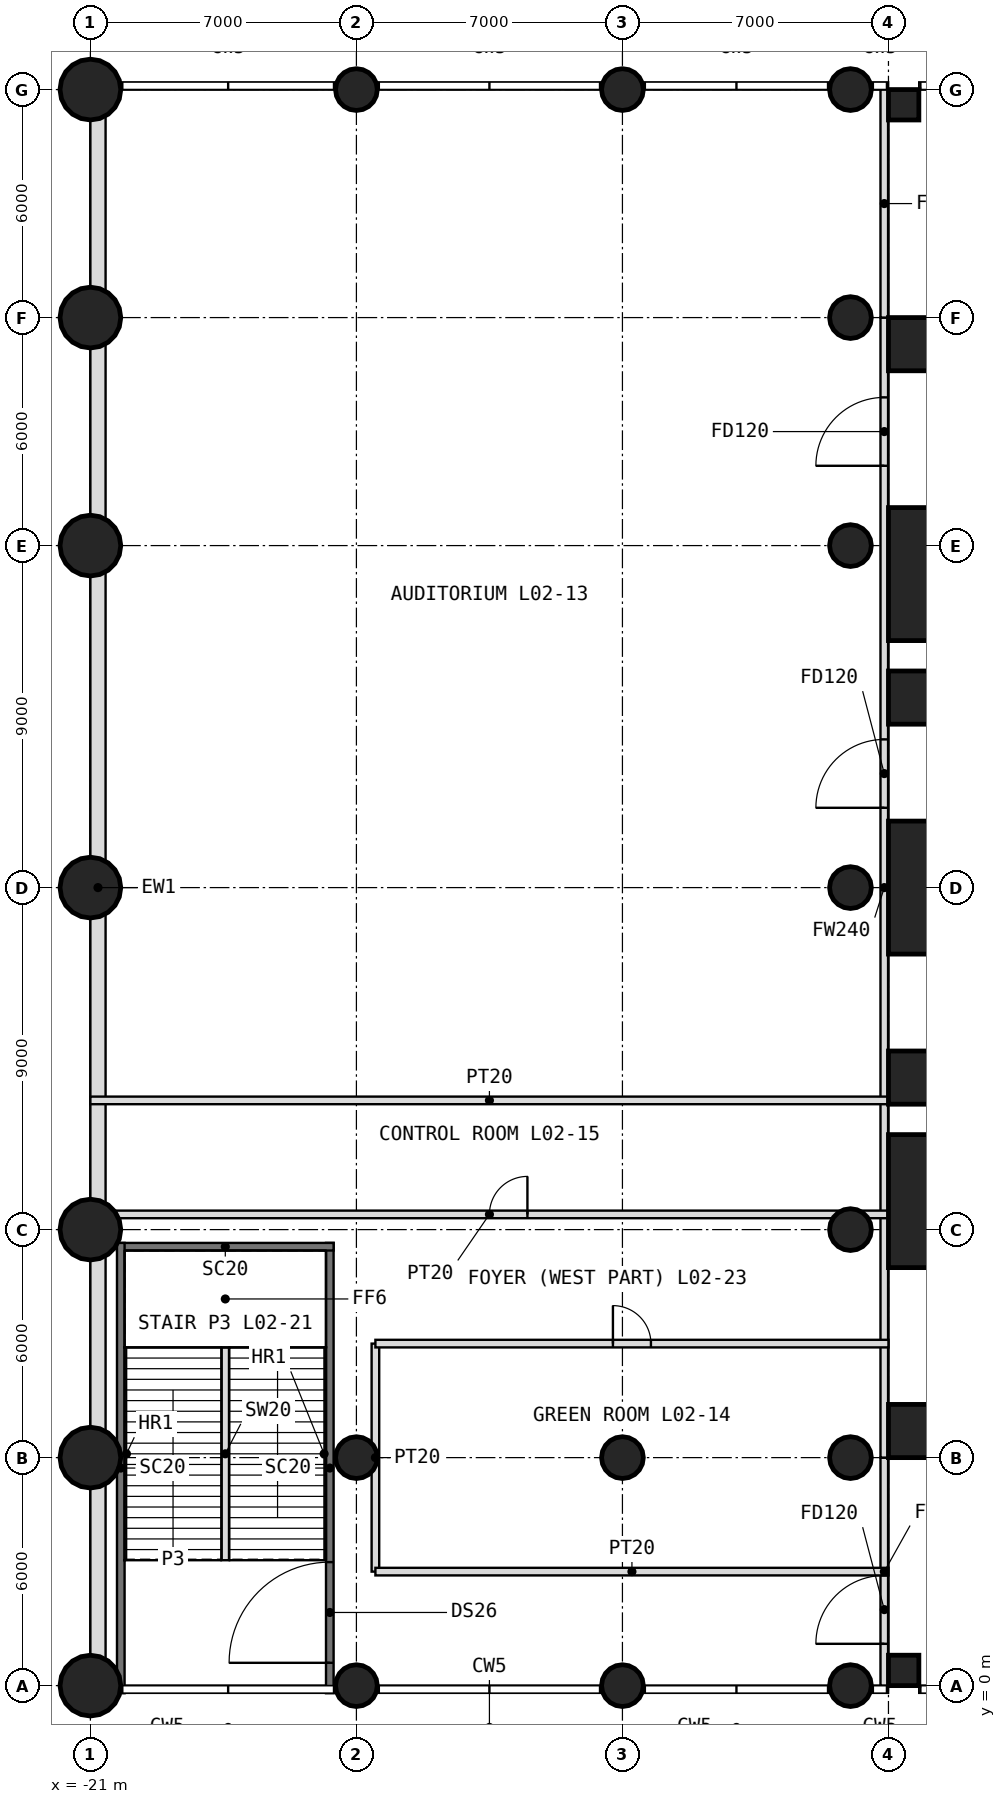
"""IFC4 building model, lengths in metres.
Left out: names, types, materials, properties, quantities, classifications, styles, units other than length and angle.
Written with IfcOpenShell. Run it as: python <this file> out.ifc"""

import sys

from ifc_helpers import new_model, si_unit, direction, frame, frame_2d, origin, origin_2d, place, context, subcontext, project, spatial, rectangle, circle, extrude, element, fill, save


model = new_model("IFC4")
c1 = context("Model", 3, precision=1e-05, world=origin(), true_north=direction((0.0, 1.0)))
c2 = subcontext(c1, "Body", "Model", "MODEL_VIEW")
j1 = project(units=[si_unit("LENGTHUNIT", "METRE"), si_unit("PLANEANGLEUNIT", "RADIAN")], contexts=[c1])
p1 = place(None, origin())
s1 = spatial("IfcSite", under=j1, at=p1, CompositionType="ELEMENT")
p2 = place(p1, origin())
s2 = spatial("IfcBuilding", under=s1, at=p2, CompositionType="ELEMENT")
p3 = place(p2, frame((0.0, 0.0, 11.0)))
s3 = spatial("IfcBuildingStorey", under=s2, at=p3, CompositionType="ELEMENT", Elevation=11.0)
p4 = place(p3, frame((-21.0, 0.0, 0.0), z_axis=(0.0, 0.0, 1.0), x_axis=(1.0, 0.0, 0.0)))
e1 = element("IfcColumn", 1, at=p4, inside=s3, PredefinedType="COLUMN", context=c2, shape_type="SweptSolid", body=[
    extrude(circle(Radius=0.8, at=origin_2d()), origin(), (0.0, 0.0, 1.0), 7.0),
])
for number, where, z_axis, x_axis in (
    (2, (-14.0, 0.0, 0.0), (0.0, 0.0, 1.0), (1.0, 0.0, 0.0)),
    (3, (-7.0, 0.0, 0.0), (0.0, 0.0, 1.0), (1.0, 0.0, 0.0)),
    (4, (-1.0, 0.0, 0.0), (0.0, 0.0, 1.0), (1.0, 0.0, 0.0)),
):
    element("IfcColumn", number, at=place(p3, frame(where, z_axis=z_axis, x_axis=x_axis)), inside=s3, PredefinedType="COLUMN", context=c2, shape_type="SweptSolid", body=[
        extrude(circle(Radius=0.55, at=origin_2d()), origin(), (0.0, 0.0, 1.0), 7.0),
    ])
p5 = place(p3, frame((0.4, 0.4, 0.0), z_axis=(0.0, 0.0, 1.0), x_axis=(1.0, 0.0, 0.0)))
e5 = element("IfcColumn", 5, at=p5, inside=s3, PredefinedType="COLUMN", context=c2, shape_type="SweptSolid", body=[
    extrude(rectangle(XDim=0.8, YDim=0.8, at=origin_2d()), origin(), (0.0, 0.0, 1.0), 7.0),
])
p6 = place(p3, frame((-21.0, 6.0, 0.0), z_axis=(0.0, 0.0, 1.0), x_axis=(1.0, 0.0, 0.0)))
e6 = element("IfcColumn", 6, at=p6, inside=s3, PredefinedType="COLUMN", context=c2, shape_type="SweptSolid", body=[
    extrude(circle(Radius=0.8, at=origin_2d()), origin(), (0.0, 0.0, 1.0), 7.0),
])
for number, where, z_axis, x_axis in (
    (7, (-14.0, 6.0, 0.0), (0.0, 0.0, 1.0), (1.0, 0.0, 0.0)),
    (8, (-7.0, 6.0, 0.0), (0.0, 0.0, 1.0), (1.0, 0.0, 0.0)),
    (9, (-1.0, 6.0, 0.0), (0.0, 0.0, 1.0), (1.0, 0.0, 0.0)),
):
    element("IfcColumn", number, at=place(p3, frame(where, z_axis=z_axis, x_axis=x_axis)), inside=s3, PredefinedType="COLUMN", context=c2, shape_type="SweptSolid", body=[
        extrude(circle(Radius=0.55, at=origin_2d()), origin(), (0.0, 0.0, 1.0), 7.0),
    ])
p7 = place(p3, frame((0.7, 6.7, 0.0), z_axis=(0.0, 0.0, 1.0), x_axis=(1.0, 0.0, 0.0)))
e10 = element("IfcColumn", 10, at=p7, inside=s3, PredefinedType="COLUMN", context=c2, shape_type="SweptSolid", body=[
    extrude(rectangle(XDim=1.4, YDim=1.4, at=origin_2d()), origin(), (0.0, 0.0, 1.0), 7.0),
])
p8 = place(p3, frame((1.75, 12.75, 0.0), z_axis=(0.0, 0.0, 1.0), x_axis=(1.0, 0.0, 0.0)))
e11 = element("IfcColumn", 11, at=p8, inside=s3, PredefinedType="COLUMN", context=c2, shape_type="SweptSolid", body=[
    extrude(rectangle(XDim=3.5, YDim=3.5, at=origin_2d()), origin(), (0.0, 0.0, 1.0), 7.0),
])
p9 = place(p3, frame((-21.0, 12.0, 0.0), z_axis=(0.0, 0.0, 1.0), x_axis=(1.0, 0.0, 0.0)))
e12 = element("IfcColumn", 12, at=p9, inside=s3, PredefinedType="COLUMN", context=c2, shape_type="SweptSolid", body=[
    extrude(circle(Radius=0.8, at=origin_2d()), origin(), (0.0, 0.0, 1.0), 7.0),
])
p10 = place(p3, frame((-20.465, 12.0, 3.556), z_axis=(0.0, 0.0, 1.0), x_axis=(1.0, 0.0, 0.0)))
e13 = element("IfcOpeningElement", 13, at=p10, cuts=e12, PredefinedType="RECESS", context=c2, shape_type="SweptSolid", body=[
    extrude(rectangle(XDim=0.57, YDim=0.474, at=origin_2d()), origin(), (0.0, 0.0, 1.0), 0.719),
])
p11 = place(p3, frame((-1.0, 12.0, 0.0), z_axis=(0.0, 0.0, 1.0), x_axis=(1.0, 0.0, 0.0)))
e14 = element("IfcColumn", 14, at=p11, inside=s3, PredefinedType="COLUMN", context=c2, shape_type="SweptSolid", body=[
    extrude(circle(Radius=0.55, at=origin_2d()), origin(), (0.0, 0.0, 1.0), 7.0),
])
p12 = place(p3, frame((-1.41, 12.0, 3.556), z_axis=(0.0, 0.0, 1.0), x_axis=(1.0, 0.0, 0.0)))
e15 = element("IfcOpeningElement", 15, at=p12, cuts=e14, PredefinedType="RECESS", context=c2, shape_type="SweptSolid", body=[
    extrude(rectangle(XDim=0.32, YDim=0.474, at=origin_2d()), origin(), (0.0, 0.0, 1.0), 0.719),
])
p13 = place(p3, frame((0.7, 16.0, 0.0), z_axis=(0.0, 0.0, 1.0), x_axis=(1.0, 0.0, 0.0)))
e16 = element("IfcColumn", 16, at=p13, inside=s3, PredefinedType="COLUMN", context=c2, shape_type="SweptSolid", body=[
    extrude(rectangle(XDim=1.4, YDim=1.4, at=origin_2d()), origin(), (0.0, 0.0, 1.0), 7.0),
])
p14 = place(p3, frame((-21.0, 21.0, 0.0), z_axis=(0.0, 0.0, 1.0), x_axis=(1.0, 0.0, 0.0)))
e17 = element("IfcColumn", 17, at=p14, inside=s3, PredefinedType="COLUMN", context=c2, shape_type="SweptSolid", body=[
    extrude(circle(Radius=0.8, at=origin_2d()), origin(), (0.0, 0.0, 1.0), 7.0),
])
p15 = place(p3, frame((-20.465, 21.0, 3.556), z_axis=(0.0, 0.0, 1.0), x_axis=(1.0, 0.0, 0.0)))
e18 = element("IfcOpeningElement", 18, at=p15, cuts=e17, PredefinedType="RECESS", context=c2, shape_type="SweptSolid", body=[
    extrude(rectangle(XDim=0.57, YDim=0.474, at=origin_2d()), origin(), (0.0, 0.0, 1.0), 0.719),
])
p16 = place(p3, frame((-1.0, 21.0, 0.0), z_axis=(0.0, 0.0, 1.0), x_axis=(1.0, 0.0, 0.0)))
e19 = element("IfcColumn", 19, at=p16, inside=s3, PredefinedType="COLUMN", context=c2, shape_type="SweptSolid", body=[
    extrude(circle(Radius=0.55, at=origin_2d()), origin(), (0.0, 0.0, 1.0), 7.0),
])
p17 = place(p3, frame((-1.41, 21.0, 3.556), z_axis=(0.0, 0.0, 1.0), x_axis=(1.0, 0.0, 0.0)))
e20 = element("IfcOpeningElement", 20, at=p17, cuts=e19, PredefinedType="RECESS", context=c2, shape_type="SweptSolid", body=[
    extrude(rectangle(XDim=0.32, YDim=0.474, at=origin_2d()), origin(), (0.0, 0.0, 1.0), 0.719),
])
p18 = place(p3, frame((1.75, 21.0, 0.0), z_axis=(0.0, 0.0, 1.0), x_axis=(1.0, 0.0, 0.0)))
e21 = element("IfcColumn", 21, at=p18, inside=s3, PredefinedType="COLUMN", context=c2, shape_type="SweptSolid", body=[
    extrude(rectangle(XDim=3.5, YDim=3.5, at=origin_2d()), origin(), (0.0, 0.0, 1.0), 7.0),
])
p19 = place(p3, frame((0.7, 26.0, 0.0), z_axis=(0.0, 0.0, 1.0), x_axis=(1.0, 0.0, 0.0)))
e22 = element("IfcColumn", 22, at=p19, inside=s3, PredefinedType="COLUMN", context=c2, shape_type="SweptSolid", body=[
    extrude(rectangle(XDim=1.4, YDim=1.4, at=origin_2d()), origin(), (0.0, 0.0, 1.0), 7.0),
])
p20 = place(p3, frame((-21.0, 30.0, 0.0), z_axis=(0.0, 0.0, 1.0), x_axis=(1.0, 0.0, 0.0)))
e23 = element("IfcColumn", 23, at=p20, inside=s3, PredefinedType="COLUMN", context=c2, shape_type="SweptSolid", body=[
    extrude(circle(Radius=0.8, at=origin_2d()), origin(), (0.0, 0.0, 1.0), 7.0),
])
p21 = place(p3, frame((-20.465, 30.0, 3.556), z_axis=(0.0, 0.0, 1.0), x_axis=(1.0, 0.0, 0.0)))
e24 = element("IfcOpeningElement", 24, at=p21, cuts=e23, PredefinedType="RECESS", context=c2, shape_type="SweptSolid", body=[
    extrude(rectangle(XDim=0.57, YDim=0.474, at=origin_2d()), origin(), (0.0, 0.0, 1.0), 0.719),
])
p22 = place(p3, frame((-1.0, 30.0, 0.0), z_axis=(0.0, 0.0, 1.0), x_axis=(1.0, 0.0, 0.0)))
e25 = element("IfcColumn", 25, at=p22, inside=s3, PredefinedType="COLUMN", context=c2, shape_type="SweptSolid", body=[
    extrude(circle(Radius=0.55, at=origin_2d()), origin(), (0.0, 0.0, 1.0), 7.0),
])
p23 = place(p3, frame((-1.41, 30.0, 3.556), z_axis=(0.0, 0.0, 1.0), x_axis=(1.0, 0.0, 0.0)))
e26 = element("IfcOpeningElement", 26, at=p23, cuts=e25, PredefinedType="RECESS", context=c2, shape_type="SweptSolid", body=[
    extrude(rectangle(XDim=0.32, YDim=0.474, at=origin_2d()), origin(), (0.0, 0.0, 1.0), 0.719),
])
p24 = place(p3, frame((1.75, 29.25, 0.0), z_axis=(0.0, 0.0, 1.0), x_axis=(1.0, 0.0, 0.0)))
e27 = element("IfcColumn", 27, at=p24, inside=s3, PredefinedType="COLUMN", context=c2, shape_type="SweptSolid", body=[
    extrude(rectangle(XDim=3.5, YDim=3.5, at=origin_2d()), origin(), (0.0, 0.0, 1.0), 7.0),
])
p25 = place(p3, frame((-21.0, 36.0, 0.0), z_axis=(0.0, 0.0, 1.0), x_axis=(1.0, 0.0, 0.0)))
e28 = element("IfcColumn", 28, at=p25, inside=s3, PredefinedType="COLUMN", context=c2, shape_type="SweptSolid", body=[
    extrude(circle(Radius=0.8, at=origin_2d()), origin(), (0.0, 0.0, 1.0), 7.0),
])
p26 = place(p3, frame((-20.465, 36.0, 3.556), z_axis=(0.0, 0.0, 1.0), x_axis=(1.0, 0.0, 0.0)))
e29 = element("IfcOpeningElement", 29, at=p26, cuts=e28, PredefinedType="RECESS", context=c2, shape_type="SweptSolid", body=[
    extrude(rectangle(XDim=0.57, YDim=0.474, at=origin_2d()), origin(), (0.0, 0.0, 1.0), 0.719),
])
p27 = place(p3, frame((-1.0, 36.0, 0.0), z_axis=(0.0, 0.0, 1.0), x_axis=(1.0, 0.0, 0.0)))
e30 = element("IfcColumn", 30, at=p27, inside=s3, PredefinedType="COLUMN", context=c2, shape_type="SweptSolid", body=[
    extrude(circle(Radius=0.55, at=origin_2d()), origin(), (0.0, 0.0, 1.0), 7.0),
])
p28 = place(p3, frame((-1.41, 36.0, 3.556), z_axis=(0.0, 0.0, 1.0), x_axis=(1.0, 0.0, 0.0)))
e31 = element("IfcOpeningElement", 31, at=p28, cuts=e30, PredefinedType="RECESS", context=c2, shape_type="SweptSolid", body=[
    extrude(rectangle(XDim=0.32, YDim=0.474, at=origin_2d()), origin(), (0.0, 0.0, 1.0), 0.719),
])
p29 = place(p3, frame((0.7, 35.3, 0.0), z_axis=(0.0, 0.0, 1.0), x_axis=(1.0, 0.0, 0.0)))
e32 = element("IfcColumn", 32, at=p29, inside=s3, PredefinedType="COLUMN", context=c2, shape_type="SweptSolid", body=[
    extrude(rectangle(XDim=1.4, YDim=1.4, at=origin_2d()), origin(), (0.0, 0.0, 1.0), 7.0),
])
p30 = place(p3, frame((-21.0, 42.0, 0.0), z_axis=(0.0, 0.0, 1.0), x_axis=(1.0, 0.0, 0.0)))
e33 = element("IfcColumn", 33, at=p30, inside=s3, PredefinedType="COLUMN", context=c2, shape_type="SweptSolid", body=[
    extrude(circle(Radius=0.8, at=origin_2d()), origin(), (0.0, 0.0, 1.0), 7.0),
])
for number, where, z_axis, x_axis in (
    (34, (-14.0, 42.0, 0.0), (0.0, 0.0, 1.0), (1.0, 0.0, 0.0)),
    (35, (-7.0, 42.0, 0.0), (0.0, 0.0, 1.0), (1.0, 0.0, 0.0)),
    (36, (-1.0, 42.0, 0.0), (0.0, 0.0, 1.0), (1.0, 0.0, 0.0)),
):
    element("IfcColumn", number, at=place(p3, frame(where, z_axis=z_axis, x_axis=x_axis)), inside=s3, PredefinedType="COLUMN", context=c2, shape_type="SweptSolid", body=[
        extrude(circle(Radius=0.55, at=origin_2d()), origin(), (0.0, 0.0, 1.0), 7.0),
    ])
p31 = place(p3, frame((0.4, 41.6, 0.0), z_axis=(0.0, 0.0, 1.0), x_axis=(1.0, 0.0, 0.0)))
e37 = element("IfcColumn", 37, at=p31, inside=s3, PredefinedType="COLUMN", context=c2, shape_type="SweptSolid", body=[
    extrude(rectangle(XDim=0.8, YDim=0.8, at=origin_2d()), origin(), (0.0, 0.0, 1.0), 7.0),
])
p32 = place(p3, frame((-20.8, 42.0, 0.0), z_axis=(0.0, 0.0, 1.0), x_axis=(0.0, -1.0, 0.0)))
e38 = element("IfcWall", 38, at=p32, inside=s3, PredefinedType="SOLIDWALL", context=c2, shape_type="SweptSolid", body=[
    extrude(rectangle(XDim=42.0, YDim=0.4, at=frame_2d((21.0, 0.0))), origin(), (0.0, 0.0, 1.0), 5.6),
])
p33 = place(p3, frame((-14.7, -0.2, -0.3), z_axis=(0.0, 0.0, 1.0), x_axis=(0.0, 1.0, 0.0)))
e39 = element("IfcWall", 39, at=p33, inside=s3, PredefinedType="SOLIDWALL", context=c2, shape_type="SweptSolid", body=[
    extrude(rectangle(XDim=11.85, YDim=0.2, at=frame_2d((5.925, 0.0))), origin(), (0.0, 0.0, 1.0), 7.1),
])
p34 = place(p33, frame((0.8, 0.0, 0.3)))
e40 = element("IfcOpeningElement", 40, at=p34, cuts=e39, PredefinedType="OPENING", context=c2, shape_type="SweptSolid", body=[
    extrude(rectangle(XDim=2.65, YDim=2.4, at=frame_2d((1.325, 1.2))), frame((0.0, 0.11, 0.0), z_axis=(0.0, -1.0, 0.0), x_axis=(1.0, 0.0, 0.0)), (0.0, 0.0, 1.0), 0.22),
])
p35 = place(p3, frame((-14.6, 11.55, -0.3), z_axis=(0.0, 0.0, 1.0), x_axis=(-1.0, 0.0, 0.0)))
e41 = element("IfcWall", 41, at=p35, inside=s3, PredefinedType="SOLIDWALL", context=c2, shape_type="SweptSolid", body=[
    extrude(rectangle(XDim=5.7, YDim=0.2, at=frame_2d((2.85, 0.0))), origin(), (0.0, 0.0, 1.0), 7.1),
])
p36 = place(p3, frame((-20.2, 11.65, -0.3), z_axis=(0.0, 0.0, 1.0), x_axis=(0.0, -1.0, 0.0)))
e42 = element("IfcWall", 42, at=p36, inside=s3, PredefinedType="SOLIDWALL", context=c2, shape_type="SweptSolid", body=[
    extrude(rectangle(XDim=11.85, YDim=0.2, at=frame_2d((5.925, 0.0))), origin(), (0.0, 0.0, 1.0), 7.1),
])
p37 = place(p3, frame((-0.11, 0.0, 0.0), z_axis=(0.0, 0.0, 1.0), x_axis=(0.0, 1.0, 0.0)))
e43 = element("IfcWall", 43, at=p37, inside=s3, PredefinedType="PARTITIONING", context=c2, shape_type="SweptSolid", body=[
    extrude(rectangle(XDim=6.0, YDim=0.2, at=frame_2d((3.0, 0.0))), origin(), (0.0, 0.0, 1.0), 5.98),
])
p38 = place(p37, frame((1.1, 0.0, 0.0)))
e44 = element("IfcOpeningElement", 44, at=p38, cuts=e43, PredefinedType="OPENING", context=c2, shape_type="SweptSolid", body=[
    extrude(rectangle(XDim=1.8, YDim=2.4, at=frame_2d((0.9, 1.2))), frame((0.0, 0.11, 0.0), z_axis=(0.0, -1.0, 0.0), x_axis=(1.0, 0.0, 0.0)), (0.0, 0.0, 1.0), 0.22),
])
p39 = place(p3, frame((-0.11, 6.0, 0.0), z_axis=(0.0, 0.0, 1.0), x_axis=(0.0, 1.0, 0.0)))
e45 = element("IfcWall", 45, at=p39, inside=s3, PredefinedType="PARTITIONING", context=c2, shape_type="SweptSolid", body=[
    extrude(rectangle(XDim=30.0, YDim=0.2, at=frame_2d((15.0, 0.0))), origin(), (0.0, 0.0, 1.0), 6.6),
])
p40 = place(p39, frame((17.1, 0.0, 0.0)))
e46 = element("IfcOpeningElement", 46, at=p40, cuts=e45, PredefinedType="OPENING", context=c2, shape_type="SweptSolid", body=[
    extrude(rectangle(XDim=1.8, YDim=2.4, at=frame_2d((0.9, 1.2))), frame((0.0, 0.11, 0.0), z_axis=(0.0, -1.0, 0.0), x_axis=(1.0, 0.0, 0.0)), (0.0, 0.0, 1.0), 0.22),
])
p41 = place(p39, frame((26.1, 0.0, 0.0)))
e47 = element("IfcOpeningElement", 47, at=p41, cuts=e45, PredefinedType="OPENING", context=c2, shape_type="SweptSolid", body=[
    extrude(rectangle(XDim=1.8, YDim=2.4, at=frame_2d((0.9, 1.2))), frame((0.0, 0.11, 0.0), z_axis=(0.0, -1.0, 0.0), x_axis=(1.0, 0.0, 0.0)), (0.0, 0.0, 1.0), 0.22),
])
p42 = place(p3, frame((-0.11, 36.0, 0.0), z_axis=(0.0, 0.0, 1.0), x_axis=(0.0, 1.0, 0.0)))
e48 = element("IfcWall", 48, at=p42, inside=s3, PredefinedType="PARTITIONING", context=c2, shape_type="SweptSolid", body=[
    extrude(rectangle(XDim=6.0, YDim=0.2, at=frame_2d((3.0, 0.0))), origin(), (0.0, 0.0, 1.0), 5.98),
])
p43 = place(p3, frame((-21.0, 12.4, 0.0), z_axis=(0.0, 0.0, 1.0), x_axis=(1.0, 0.0, 0.0)))
e49 = element("IfcWall", 49, at=p43, inside=s3, PredefinedType="PARTITIONING", context=c2, shape_type="SweptSolid", body=[
    extrude(rectangle(XDim=21.0, YDim=0.2, at=frame_2d((10.5, 0.0))), origin(), (0.0, 0.0, 1.0), 6.6),
])
p44 = place(p43, frame((10.5, 0.0, 0.0)))
e50 = element("IfcOpeningElement", 50, at=p44, cuts=e49, PredefinedType="OPENING", context=c2, shape_type="SweptSolid", body=[
    extrude(rectangle(XDim=1.0, YDim=2.2, at=frame_2d((0.5, 1.1))), frame((0.0, 0.11, 0.0), z_axis=(0.0, -1.0, 0.0), x_axis=(1.0, 0.0, 0.0)), (0.0, 0.0, 1.0), 0.22),
])
p45 = place(p3, frame((-21.0, 15.4, 0.0), z_axis=(0.0, 0.0, 1.0), x_axis=(1.0, 0.0, 0.0)))
e51 = element("IfcWall", 51, at=p45, inside=s3, PredefinedType="PARTITIONING", context=c2, shape_type="SweptSolid", body=[
    extrude(rectangle(XDim=21.0, YDim=0.2, at=frame_2d((10.5, 0.0))), origin(), (0.0, 0.0, 1.0), 6.6),
])
p46 = place(p3, frame((-13.5, 3.0, 0.0), z_axis=(0.0, 0.0, 1.0), x_axis=(0.0, 1.0, 0.0)))
e52 = element("IfcWall", 52, at=p46, inside=s3, PredefinedType="PARTITIONING", context=c2, shape_type="SweptSolid", body=[
    extrude(rectangle(XDim=6.0, YDim=0.2, at=frame_2d((3.0, 0.0))), origin(), (0.0, 0.0, 1.0), 6.6),
])
p47 = place(p3, frame((-13.5, 3.0, 0.0), z_axis=(0.0, 0.0, 1.0), x_axis=(1.0, 0.0, 0.0)))
e53 = element("IfcWall", 53, at=p47, inside=s3, PredefinedType="PARTITIONING", context=c2, shape_type="SweptSolid", body=[
    extrude(rectangle(XDim=13.5, YDim=0.2, at=frame_2d((6.75, 0.0))), origin(), (0.0, 0.0, 1.0), 6.6),
])
p48 = place(p3, frame((-13.5, 9.0, 0.0), z_axis=(0.0, 0.0, 1.0), x_axis=(1.0, 0.0, 0.0)))
e54 = element("IfcWall", 54, at=p48, inside=s3, PredefinedType="PARTITIONING", context=c2, shape_type="SweptSolid", body=[
    extrude(rectangle(XDim=13.5, YDim=0.2, at=frame_2d((6.75, 0.0))), origin(), (0.0, 0.0, 1.0), 6.6),
])
p49 = place(p48, frame((6.25, 0.0, 0.0)))
e55 = element("IfcOpeningElement", 55, at=p49, cuts=e54, PredefinedType="OPENING", context=c2, shape_type="SweptSolid", body=[
    extrude(rectangle(XDim=1.0, YDim=2.2, at=frame_2d((0.5, 1.1))), frame((0.0, 0.11, 0.0), z_axis=(0.0, -1.0, 0.0), x_axis=(1.0, 0.0, 0.0)), (0.0, 0.0, 1.0), 0.22),
])
p50 = place(p3, frame((-17.45, 3.3, 0.0), z_axis=(0.0, 0.0, 1.0), x_axis=(0.0, 1.0, 0.0)))
e56 = element("IfcWall", 56, at=p50, inside=s3, PredefinedType="PARTITIONING", context=c2, shape_type="SweptSolid", body=[
    extrude(rectangle(XDim=5.6, YDim=0.2, at=frame_2d((2.8, 0.0))), origin(), (0.0, 0.0, 1.0), 7.0),
])
p51 = place(p34, origin())
e57 = element("IfcDoor", 57, at=p51, inside=s3, OperationType="DOUBLE_DOOR_SINGLE_SWING", PredefinedType="DOOR", context=c2, shape_type="SweptSolid", body=[
    extrude(rectangle(XDim=2.65, YDim=2.4, at=frame_2d((1.325, 1.2))), frame((0.0, 0.025, 0.0), z_axis=(0.0, -1.0, 0.0), x_axis=(1.0, 0.0, 0.0)), (0.0, 0.0, 1.0), 0.05),
])
fill(e40, e57)
p52 = place(p38, origin())
e58 = element("IfcDoor", 58, at=p52, inside=s3, OperationType="DOUBLE_DOOR_SINGLE_SWING", PredefinedType="DOOR", context=c2, shape_type="SweptSolid", body=[
    extrude(rectangle(XDim=1.8, YDim=2.4, at=frame_2d((0.9, 1.2))), frame((0.0, 0.025, 0.0), z_axis=(0.0, -1.0, 0.0), x_axis=(1.0, 0.0, 0.0)), (0.0, 0.0, 1.0), 0.05),
])
fill(e44, e58)
p53 = place(p40, origin())
e59 = element("IfcDoor", 59, at=p53, inside=s3, OperationType="DOUBLE_DOOR_SINGLE_SWING", PredefinedType="DOOR", context=c2, shape_type="SweptSolid", body=[
    extrude(rectangle(XDim=1.8, YDim=2.4, at=frame_2d((0.9, 1.2))), frame((0.0, 0.025, 0.0), z_axis=(0.0, -1.0, 0.0), x_axis=(1.0, 0.0, 0.0)), (0.0, 0.0, 1.0), 0.05),
])
fill(e46, e59)
p54 = place(p49, origin())
e60 = element("IfcDoor", 60, at=p54, inside=s3, OperationType="SINGLE_SWING_LEFT", PredefinedType="DOOR", context=c2, shape_type="SweptSolid", body=[
    extrude(rectangle(XDim=1.0, YDim=2.2, at=frame_2d((0.5, 1.1))), frame((0.0, 0.025, 0.0), z_axis=(0.0, -1.0, 0.0), x_axis=(1.0, 0.0, 0.0)), (0.0, 0.0, 1.0), 0.05),
])
fill(e55, e60)
p55 = place(p44, origin())
e61 = element("IfcDoor", 61, at=p55, inside=s3, OperationType="SINGLE_SWING_RIGHT", PredefinedType="DOOR", context=c2, shape_type="SweptSolid", body=[
    extrude(rectangle(XDim=1.0, YDim=2.2, at=frame_2d((0.5, 1.1))), frame((0.0, 0.025, 0.0), z_axis=(0.0, -1.0, 0.0), x_axis=(1.0, 0.0, 0.0)), (0.0, 0.0, 1.0), 0.05),
])
fill(e50, e61)
p56 = place(p41, origin())
e62 = element("IfcDoor", 62, at=p56, inside=s3, OperationType="DOUBLE_DOOR_SINGLE_SWING", PredefinedType="DOOR", context=c2, shape_type="SweptSolid", body=[
    extrude(rectangle(XDim=1.8, YDim=2.4, at=frame_2d((0.9, 1.2))), frame((0.0, 0.025, 0.0), z_axis=(0.0, -1.0, 0.0), x_axis=(1.0, 0.0, 0.0)), (0.0, 0.0, 1.0), 0.05),
])
fill(e47, e62)
save(model, sys.argv[1])
